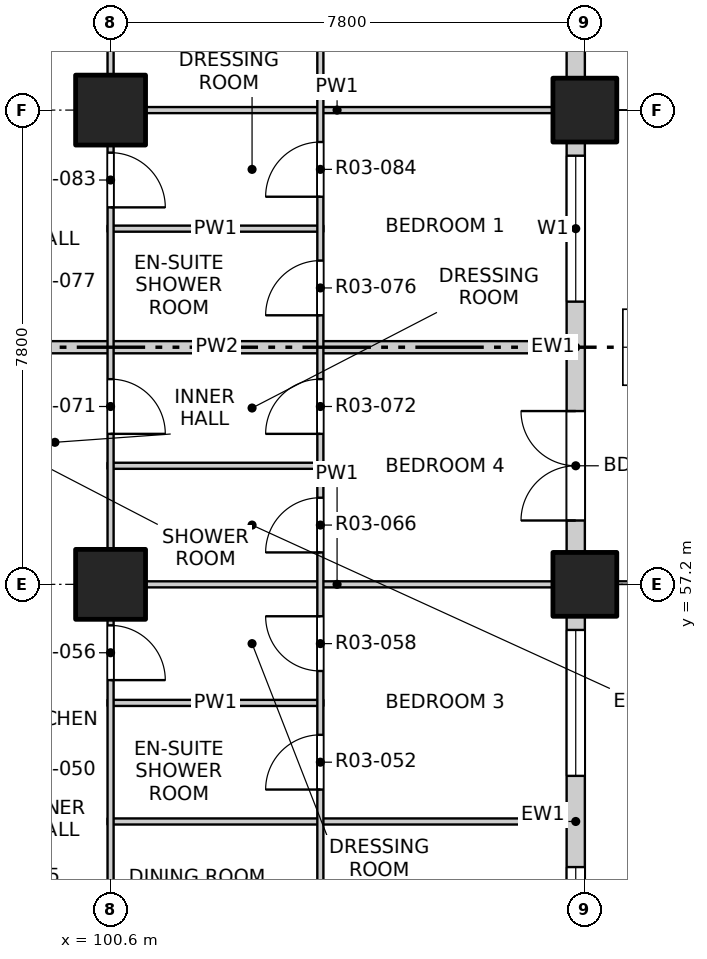
"""IFC4 building model, lengths in metres.
Left out: names, types, materials, properties, quantities, classifications, styles, units other than length and angle.
Written with IfcOpenShell. Run it as: python <this file> out.ifc"""

import sys

from ifc_helpers import new_model, si_unit, direction, frame, frame_2d, origin, origin_2d, place, context, subcontext, project, spatial, rectangle, extrude, element, fill, save


model = new_model("IFC4")
c1 = context("Model", 3, precision=1e-05, world=origin(), true_north=direction((0.0, 1.0)))
c2 = subcontext(c1, "Body", "Model", "MODEL_VIEW")
j1 = project(units=[si_unit("LENGTHUNIT", "METRE"), si_unit("PLANEANGLEUNIT", "RADIAN")], contexts=[c1])
p1 = place(None, origin())
s1 = spatial("IfcSite", under=j1, at=p1, CompositionType="ELEMENT")
p2 = place(p1, origin())
s2 = spatial("IfcBuilding", under=s1, at=p2, CompositionType="ELEMENT")
p3 = place(p2, frame((0.0, 0.0, 39.9)))
s3 = spatial("IfcBuildingStorey", under=s2, at=p3, CompositionType="ELEMENT", Elevation=39.9)
for number, where, z_axis, x_axis in (
    (1, (108.4, 57.2, -0.25), (0.0, 0.0, 1.0), (1.0, 0.0, 0.0)),
    (2, (108.4, 65.0, -0.25), (0.0, 0.0, 1.0), (1.0, 0.0, 0.0)),
):
    element("IfcColumn", number, at=place(p3, frame(where, z_axis=z_axis, x_axis=x_axis)), inside=s3, PredefinedType="COLUMN", context=c2, shape_type="SweptSolid", body=[
        extrude(rectangle(XDim=1.05, YDim=1.05, at=origin_2d()), origin(), (0.0, 0.0, 1.0), 3.4),
    ])
for number, where, z_axis, x_axis in (
    (3, (100.6, 57.2, -0.25), (0.0, 0.0, 1.0), (1.0, 0.0, 0.0)),
    (4, (100.6, 65.0, -0.25), (0.0, 0.0, 1.0), (1.0, 0.0, 0.0)),
):
    element("IfcColumn", number, at=place(p3, frame(where, z_axis=z_axis, x_axis=x_axis)), inside=s3, PredefinedType="COLUMN", context=c2, shape_type="SweptSolid", body=[
        extrude(rectangle(XDim=1.15, YDim=1.15, at=origin_2d()), origin(), (0.0, 0.0, 1.0), 3.4),
    ])
p4 = place(p3, frame((108.25, 49.925, 0.0), z_axis=(0.0, 0.0, 1.0), x_axis=(0.0, 1.0, 0.0)))
e5 = element("IfcWall", 5, at=p4, inside=s3, PredefinedType="SOLIDWALL", context=c2, shape_type="SweptSolid", body=[
    extrude(rectangle(XDim=6.75, YDim=0.3, at=frame_2d((3.375, 0.0))), origin(), (0.0, 0.0, 1.0), 2.7),
])
p5 = place(p4, frame((0.225, 0.0, 0.9)))
e6 = element("IfcOpeningElement", 6, at=p5, cuts=e5, PredefinedType="OPENING", context=c2, shape_type="SweptSolid", body=[
    extrude(rectangle(XDim=2.4, YDim=1.8, at=frame_2d((1.2, 0.9))), frame((0.0, 0.16, 0.0), z_axis=(0.0, -1.0, 0.0), x_axis=(1.0, 0.0, 0.0)), (0.0, 0.0, 1.0), 0.32),
])
p6 = place(p4, frame((4.125, 0.0, 0.9)))
e7 = element("IfcOpeningElement", 7, at=p6, cuts=e5, PredefinedType="OPENING", context=c2, shape_type="SweptSolid", body=[
    extrude(rectangle(XDim=2.4, YDim=1.8, at=frame_2d((1.2, 0.9))), frame((0.0, 0.16, 0.0), z_axis=(0.0, -1.0, 0.0), x_axis=(1.0, 0.0, 0.0)), (0.0, 0.0, 1.0), 0.32),
])
p7 = place(p3, frame((108.25, 57.725, 0.0), z_axis=(0.0, 0.0, 1.0), x_axis=(0.0, 1.0, 0.0)))
e8 = element("IfcWall", 8, at=p7, inside=s3, PredefinedType="SOLIDWALL", context=c2, shape_type="SweptSolid", body=[
    extrude(rectangle(XDim=6.75, YDim=0.3, at=frame_2d((3.375, 0.0))), origin(), (0.0, 0.0, 1.0), 2.7),
])
p8 = place(p7, frame((0.525, 0.0, 0.0)))
e9 = element("IfcOpeningElement", 9, at=p8, cuts=e8, PredefinedType="OPENING", context=c2, shape_type="SweptSolid", body=[
    extrude(rectangle(XDim=1.8, YDim=2.4, at=frame_2d((0.9, 1.2))), frame((0.0, 0.16, 0.0), z_axis=(0.0, -1.0, 0.0), x_axis=(1.0, 0.0, 0.0)), (0.0, 0.0, 1.0), 0.32),
])
p9 = place(p7, frame((4.125, 0.0, 0.9)))
e10 = element("IfcOpeningElement", 10, at=p9, cuts=e8, PredefinedType="OPENING", context=c2, shape_type="SweptSolid", body=[
    extrude(rectangle(XDim=2.4, YDim=1.8, at=frame_2d((1.2, 0.9))), frame((0.0, 0.16, 0.0), z_axis=(0.0, -1.0, 0.0), x_axis=(1.0, 0.0, 0.0)), (0.0, 0.0, 1.0), 0.32),
])
p10 = place(p3, frame((108.25, 65.525, 0.0), z_axis=(0.0, 0.0, 1.0), x_axis=(0.0, 1.0, 0.0)))
e11 = element("IfcWall", 11, at=p10, inside=s3, PredefinedType="SOLIDWALL", context=c2, shape_type="SweptSolid", body=[
    extrude(rectangle(XDim=6.75, YDim=0.3, at=frame_2d((3.375, 0.0))), origin(), (0.0, 0.0, 1.0), 2.7),
])
p11 = place(p10, frame((0.525, 0.0, 0.0)))
e12 = element("IfcOpeningElement", 12, at=p11, cuts=e11, PredefinedType="OPENING", context=c2, shape_type="SweptSolid", body=[
    extrude(rectangle(XDim=1.8, YDim=2.4, at=frame_2d((0.9, 1.2))), frame((0.0, 0.16, 0.0), z_axis=(0.0, -1.0, 0.0), x_axis=(1.0, 0.0, 0.0)), (0.0, 0.0, 1.0), 0.32),
])
p12 = place(p10, frame((4.125, 0.0, 0.9)))
e13 = element("IfcOpeningElement", 13, at=p12, cuts=e11, PredefinedType="OPENING", context=c2, shape_type="SweptSolid", body=[
    extrude(rectangle(XDim=2.4, YDim=1.8, at=frame_2d((1.2, 0.9))), frame((0.0, 0.16, 0.0), z_axis=(0.0, -1.0, 0.0), x_axis=(1.0, 0.0, 0.0)), (0.0, 0.0, 1.0), 0.32),
])
p13 = place(p3, frame((100.55, 53.3, 0.0), z_axis=(0.0, 0.0, 1.0), x_axis=(1.0, 0.0, 0.0)))
e14 = element("IfcWall", 14, at=p13, inside=s3, PredefinedType="PARTITIONING", context=c2, shape_type="SweptSolid", body=[
    extrude(rectangle(XDim=7.55, YDim=0.1, at=frame_2d((3.775, 0.0))), origin(), (0.0, 0.0, 1.0), 3.15),
])
p14 = place(p3, frame((100.55, 55.25, 0.0), z_axis=(0.0, 0.0, 1.0), x_axis=(1.0, 0.0, 0.0)))
e15 = element("IfcWall", 15, at=p14, inside=s3, PredefinedType="PARTITIONING", context=c2, shape_type="SweptSolid", body=[
    extrude(rectangle(XDim=3.55, YDim=0.1, at=frame_2d((1.775, 0.0))), origin(), (0.0, 0.0, 1.0), 3.15),
])
p15 = place(p3, frame((100.55, 57.2, 0.0), z_axis=(0.0, 0.0, 1.0), x_axis=(1.0, 0.0, 0.0)))
e16 = element("IfcWall", 16, at=p15, inside=s3, PredefinedType="PARTITIONING", context=c2, shape_type="SweptSolid", body=[
    extrude(rectangle(XDim=7.55, YDim=0.1, at=frame_2d((3.775, 0.0))), origin(), (0.0, 0.0, 1.0), 2.55),
])
p16 = place(p3, frame((100.55, 59.15, 0.0), z_axis=(0.0, 0.0, 1.0), x_axis=(1.0, 0.0, 0.0)))
e17 = element("IfcWall", 17, at=p16, inside=s3, PredefinedType="PARTITIONING", context=c2, shape_type="SweptSolid", body=[
    extrude(rectangle(XDim=3.55, YDim=0.1, at=frame_2d((1.775, 0.0))), origin(), (0.0, 0.0, 1.0), 3.15),
])
p17 = place(p3, frame((96.6, 61.1, 0.0), z_axis=(0.0, 0.0, 1.0), x_axis=(1.0, 0.0, 0.0)))
e18 = element("IfcWall", 18, at=p17, inside=s3, PredefinedType="PARTITIONING", context=c2, shape_type="SweptSolid", body=[
    extrude(rectangle(XDim=11.5, YDim=0.2, at=frame_2d((5.75, 0.0))), origin(), (0.0, 0.0, 1.0), 3.15),
])
p18 = place(p3, frame((100.55, 63.05, 0.0), z_axis=(0.0, 0.0, 1.0), x_axis=(1.0, 0.0, 0.0)))
e19 = element("IfcWall", 19, at=p18, inside=s3, PredefinedType="PARTITIONING", context=c2, shape_type="SweptSolid", body=[
    extrude(rectangle(XDim=3.55, YDim=0.1, at=frame_2d((1.775, 0.0))), origin(), (0.0, 0.0, 1.0), 3.15),
])
p19 = place(p3, frame((100.55, 65.0, 0.0), z_axis=(0.0, 0.0, 1.0), x_axis=(1.0, 0.0, 0.0)))
e20 = element("IfcWall", 20, at=p19, inside=s3, PredefinedType="PARTITIONING", context=c2, shape_type="SweptSolid", body=[
    extrude(rectangle(XDim=7.55, YDim=0.1, at=frame_2d((3.775, 0.0))), origin(), (0.0, 0.0, 1.0), 2.55),
])
p20 = place(p3, frame((100.6, 49.4, 0.0), z_axis=(0.0, 0.0, 1.0), x_axis=(0.0, 1.0, 0.0)))
e21 = element("IfcWall", 21, at=p20, inside=s3, PredefinedType="PARTITIONING", context=c2, shape_type="SweptSolid", body=[
    extrude(rectangle(XDim=31.2, YDim=0.1, at=frame_2d((15.6, 0.0))), origin(), (0.0, 0.0, 1.0), 3.15),
])
p21 = place(p20, frame((1.5, 0.0, 0.0)))
e22 = element("IfcOpeningElement", 22, at=p21, cuts=e21, PredefinedType="OPENING", context=c2, shape_type="SweptSolid", body=[
    extrude(rectangle(XDim=0.9, YDim=2.1, at=frame_2d((0.45, 1.05))), frame((0.0, 0.06, 0.0), z_axis=(0.0, -1.0, 0.0), x_axis=(1.0, 0.0, 0.0)), (0.0, 0.0, 1.0), 0.12),
])
p22 = place(p20, frame((6.225, 0.0, 0.0)))
e23 = element("IfcOpeningElement", 23, at=p22, cuts=e21, PredefinedType="OPENING", context=c2, shape_type="SweptSolid", body=[
    extrude(rectangle(XDim=0.9, YDim=2.1, at=frame_2d((0.45, 1.05))), frame((0.0, 0.06, 0.0), z_axis=(0.0, -1.0, 0.0), x_axis=(1.0, 0.0, 0.0)), (0.0, 0.0, 1.0), 0.12),
])
p23 = place(p20, frame((10.275, 0.0, 0.0)))
e24 = element("IfcOpeningElement", 24, at=p23, cuts=e21, PredefinedType="OPENING", context=c2, shape_type="SweptSolid", body=[
    extrude(rectangle(XDim=0.9, YDim=2.1, at=frame_2d((0.45, 1.05))), frame((0.0, 0.06, 0.0), z_axis=(0.0, -1.0, 0.0), x_axis=(1.0, 0.0, 0.0)), (0.0, 0.0, 1.0), 0.12),
])
p24 = place(p20, frame((14.0, 0.0, 0.0)))
e25 = element("IfcOpeningElement", 25, at=p24, cuts=e21, PredefinedType="OPENING", context=c2, shape_type="SweptSolid", body=[
    extrude(rectangle(XDim=0.9, YDim=2.1, at=frame_2d((0.45, 1.05))), frame((0.0, 0.06, 0.0), z_axis=(0.0, -1.0, 0.0), x_axis=(1.0, 0.0, 0.0)), (0.0, 0.0, 1.0), 0.12),
])
p25 = place(p20, frame((17.1, 0.0, 0.0)))
e26 = element("IfcOpeningElement", 26, at=p25, cuts=e21, PredefinedType="OPENING", context=c2, shape_type="SweptSolid", body=[
    extrude(rectangle(XDim=0.9, YDim=2.1, at=frame_2d((0.45, 1.05))), frame((0.0, 0.06, 0.0), z_axis=(0.0, -1.0, 0.0), x_axis=(1.0, 0.0, 0.0)), (0.0, 0.0, 1.0), 0.12),
])
p26 = place(p20, frame((21.0, 0.0, 0.0)))
e27 = element("IfcOpeningElement", 27, at=p26, cuts=e21, PredefinedType="OPENING", context=c2, shape_type="SweptSolid", body=[
    extrude(rectangle(XDim=0.9, YDim=2.1, at=frame_2d((0.45, 1.05))), frame((0.0, 0.06, 0.0), z_axis=(0.0, -1.0, 0.0), x_axis=(1.0, 0.0, 0.0)), (0.0, 0.0, 1.0), 0.12),
])
p27 = place(p20, frame((25.875, 0.0, 0.0)))
e28 = element("IfcOpeningElement", 28, at=p27, cuts=e21, PredefinedType="OPENING", context=c2, shape_type="SweptSolid", body=[
    extrude(rectangle(XDim=0.9, YDim=2.1, at=frame_2d((0.45, 1.05))), frame((0.0, 0.06, 0.0), z_axis=(0.0, -1.0, 0.0), x_axis=(1.0, 0.0, 0.0)), (0.0, 0.0, 1.0), 0.12),
])
p28 = place(p20, frame((29.6, 0.0, 0.0)))
e29 = element("IfcOpeningElement", 29, at=p28, cuts=e21, PredefinedType="OPENING", context=c2, shape_type="SweptSolid", body=[
    extrude(rectangle(XDim=0.9, YDim=2.1, at=frame_2d((0.45, 1.05))), frame((0.0, 0.06, 0.0), z_axis=(0.0, -1.0, 0.0), x_axis=(1.0, 0.0, 0.0)), (0.0, 0.0, 1.0), 0.12),
])
p29 = place(p3, frame((104.05, 41.9, 0.0), z_axis=(0.0, 0.0, 1.0), x_axis=(0.0, 1.0, 0.0)))
e30 = element("IfcWall", 30, at=p29, inside=s3, PredefinedType="PARTITIONING", context=c2, shape_type="SweptSolid", body=[
    extrude(rectangle(XDim=46.2, YDim=0.1, at=frame_2d((23.1, 0.0))), origin(), (0.0, 0.0, 1.0), 3.15),
])
p30 = place(p29, frame((1.05, 0.0, 0.0)))
e31 = element("IfcOpeningElement", 31, at=p30, cuts=e30, PredefinedType="OPENING", context=c2, shape_type="SweptSolid", body=[
    extrude(rectangle(XDim=1.2, YDim=2.1, at=frame_2d((0.6, 1.05))), frame((0.0, 0.06, 0.0), z_axis=(0.0, -1.0, 0.0), x_axis=(1.0, 0.0, 0.0)), (0.0, 0.0, 1.0), 0.12),
])
p31 = place(p29, frame((4.125, 0.0, 0.0)))
e32 = element("IfcOpeningElement", 32, at=p31, cuts=e30, PredefinedType="OPENING", context=c2, shape_type="SweptSolid", body=[
    extrude(rectangle(XDim=0.9, YDim=2.1, at=frame_2d((0.45, 1.05))), frame((0.0, 0.06, 0.0), z_axis=(0.0, -1.0, 0.0), x_axis=(1.0, 0.0, 0.0)), (0.0, 0.0, 1.0), 0.12),
])
p32 = place(p29, frame((6.075, 0.0, 0.0)))
e33 = element("IfcOpeningElement", 33, at=p32, cuts=e30, PredefinedType="OPENING", context=c2, shape_type="SweptSolid", body=[
    extrude(rectangle(XDim=0.9, YDim=2.1, at=frame_2d((0.45, 1.05))), frame((0.0, 0.06, 0.0), z_axis=(0.0, -1.0, 0.0), x_axis=(1.0, 0.0, 0.0)), (0.0, 0.0, 1.0), 0.12),
])
p33 = place(p29, frame((8.85, 0.0, 0.0)))
e34 = element("IfcOpeningElement", 34, at=p33, cuts=e30, PredefinedType="OPENING", context=c2, shape_type="SweptSolid", body=[
    extrude(rectangle(XDim=1.2, YDim=2.1, at=frame_2d((0.6, 1.05))), frame((0.0, 0.06, 0.0), z_axis=(0.0, -1.0, 0.0), x_axis=(1.0, 0.0, 0.0)), (0.0, 0.0, 1.0), 0.12),
])
p34 = place(p29, frame((11.925, 0.0, 0.0)))
e35 = element("IfcOpeningElement", 35, at=p34, cuts=e30, PredefinedType="OPENING", context=c2, shape_type="SweptSolid", body=[
    extrude(rectangle(XDim=0.9, YDim=2.1, at=frame_2d((0.45, 1.05))), frame((0.0, 0.06, 0.0), z_axis=(0.0, -1.0, 0.0), x_axis=(1.0, 0.0, 0.0)), (0.0, 0.0, 1.0), 0.12),
])
p35 = place(p29, frame((13.875, 0.0, 0.0)))
e36 = element("IfcOpeningElement", 36, at=p35, cuts=e30, PredefinedType="OPENING", context=c2, shape_type="SweptSolid", body=[
    extrude(rectangle(XDim=0.9, YDim=2.1, at=frame_2d((0.45, 1.05))), frame((0.0, 0.06, 0.0), z_axis=(0.0, -1.0, 0.0), x_axis=(1.0, 0.0, 0.0)), (0.0, 0.0, 1.0), 0.12),
])
p36 = place(p29, frame((15.825, 0.0, 0.0)))
e37 = element("IfcOpeningElement", 37, at=p36, cuts=e30, PredefinedType="OPENING", context=c2, shape_type="SweptSolid", body=[
    extrude(rectangle(XDim=0.9, YDim=2.1, at=frame_2d((0.45, 1.05))), frame((0.0, 0.06, 0.0), z_axis=(0.0, -1.0, 0.0), x_axis=(1.0, 0.0, 0.0)), (0.0, 0.0, 1.0), 0.12),
])
p37 = place(p29, frame((17.775, 0.0, 0.0)))
e38 = element("IfcOpeningElement", 38, at=p37, cuts=e30, PredefinedType="OPENING", context=c2, shape_type="SweptSolid", body=[
    extrude(rectangle(XDim=0.9, YDim=2.1, at=frame_2d((0.45, 1.05))), frame((0.0, 0.06, 0.0), z_axis=(0.0, -1.0, 0.0), x_axis=(1.0, 0.0, 0.0)), (0.0, 0.0, 1.0), 0.12),
])
p38 = place(p29, frame((19.725, 0.0, 0.0)))
e39 = element("IfcOpeningElement", 39, at=p38, cuts=e30, PredefinedType="OPENING", context=c2, shape_type="SweptSolid", body=[
    extrude(rectangle(XDim=0.9, YDim=2.1, at=frame_2d((0.45, 1.05))), frame((0.0, 0.06, 0.0), z_axis=(0.0, -1.0, 0.0), x_axis=(1.0, 0.0, 0.0)), (0.0, 0.0, 1.0), 0.12),
])
p39 = place(p29, frame((21.675, 0.0, 0.0)))
e40 = element("IfcOpeningElement", 40, at=p39, cuts=e30, PredefinedType="OPENING", context=c2, shape_type="SweptSolid", body=[
    extrude(rectangle(XDim=0.9, YDim=2.1, at=frame_2d((0.45, 1.05))), frame((0.0, 0.06, 0.0), z_axis=(0.0, -1.0, 0.0), x_axis=(1.0, 0.0, 0.0)), (0.0, 0.0, 1.0), 0.12),
])
p40 = place(p29, frame((24.45, 0.0, 0.0)))
e41 = element("IfcOpeningElement", 41, at=p40, cuts=e30, PredefinedType="OPENING", context=c2, shape_type="SweptSolid", body=[
    extrude(rectangle(XDim=1.2, YDim=2.1, at=frame_2d((0.6, 1.05))), frame((0.0, 0.06, 0.0), z_axis=(0.0, -1.0, 0.0), x_axis=(1.0, 0.0, 0.0)), (0.0, 0.0, 1.0), 0.12),
])
p41 = place(p29, frame((28.35, 0.0, 0.0)))
e42 = element("IfcOpeningElement", 42, at=p41, cuts=e30, PredefinedType="OPENING", context=c2, shape_type="SweptSolid", body=[
    extrude(rectangle(XDim=1.2, YDim=2.1, at=frame_2d((0.6, 1.05))), frame((0.0, 0.06, 0.0), z_axis=(0.0, -1.0, 0.0), x_axis=(1.0, 0.0, 0.0)), (0.0, 0.0, 1.0), 0.12),
])
p42 = place(p29, frame((31.425, 0.0, 0.0)))
e43 = element("IfcOpeningElement", 43, at=p42, cuts=e30, PredefinedType="OPENING", context=c2, shape_type="SweptSolid", body=[
    extrude(rectangle(XDim=0.9, YDim=2.1, at=frame_2d((0.45, 1.05))), frame((0.0, 0.06, 0.0), z_axis=(0.0, -1.0, 0.0), x_axis=(1.0, 0.0, 0.0)), (0.0, 0.0, 1.0), 0.12),
])
p43 = place(p29, frame((33.375, 0.0, 0.0)))
e44 = element("IfcOpeningElement", 44, at=p43, cuts=e30, PredefinedType="OPENING", context=c2, shape_type="SweptSolid", body=[
    extrude(rectangle(XDim=0.9, YDim=2.1, at=frame_2d((0.45, 1.05))), frame((0.0, 0.06, 0.0), z_axis=(0.0, -1.0, 0.0), x_axis=(1.0, 0.0, 0.0)), (0.0, 0.0, 1.0), 0.12),
])
p44 = place(p29, frame((35.325, 0.0, 0.0)))
e45 = element("IfcOpeningElement", 45, at=p44, cuts=e30, PredefinedType="OPENING", context=c2, shape_type="SweptSolid", body=[
    extrude(rectangle(XDim=0.9, YDim=2.1, at=frame_2d((0.45, 1.05))), frame((0.0, 0.06, 0.0), z_axis=(0.0, -1.0, 0.0), x_axis=(1.0, 0.0, 0.0)), (0.0, 0.0, 1.0), 0.12),
])
p45 = place(p29, frame((37.275, 0.0, 0.0)))
e46 = element("IfcOpeningElement", 46, at=p45, cuts=e30, PredefinedType="OPENING", context=c2, shape_type="SweptSolid", body=[
    extrude(rectangle(XDim=0.9, YDim=2.1, at=frame_2d((0.45, 1.05))), frame((0.0, 0.06, 0.0), z_axis=(0.0, -1.0, 0.0), x_axis=(1.0, 0.0, 0.0)), (0.0, 0.0, 1.0), 0.12),
])
p46 = place(p29, frame((40.05, 0.0, 0.0)))
e47 = element("IfcOpeningElement", 47, at=p46, cuts=e30, PredefinedType="OPENING", context=c2, shape_type="SweptSolid", body=[
    extrude(rectangle(XDim=1.2, YDim=2.1, at=frame_2d((0.6, 1.05))), frame((0.0, 0.06, 0.0), z_axis=(0.0, -1.0, 0.0), x_axis=(1.0, 0.0, 0.0)), (0.0, 0.0, 1.0), 0.12),
])
p47 = place(p29, frame((43.95, 0.0, 0.0)))
e48 = element("IfcOpeningElement", 48, at=p47, cuts=e30, PredefinedType="OPENING", context=c2, shape_type="SweptSolid", body=[
    extrude(rectangle(XDim=1.2, YDim=2.1, at=frame_2d((0.6, 1.05))), frame((0.0, 0.06, 0.0), z_axis=(0.0, -1.0, 0.0), x_axis=(1.0, 0.0, 0.0)), (0.0, 0.0, 1.0), 0.12),
])
p48 = place(p5, origin())
e49 = element("IfcWindow", 49, at=p48, inside=s3, PartitioningType="DOUBLE_PANEL_VERTICAL", PredefinedType="WINDOW", context=c2, shape_type="SweptSolid", body=[
    extrude(rectangle(XDim=2.4, YDim=1.8, at=frame_2d((1.2, 0.9))), frame((0.0, 0.03, 0.0), z_axis=(0.0, -1.0, 0.0), x_axis=(1.0, 0.0, 0.0)), (0.0, 0.0, 1.0), 0.06),
])
fill(e6, e49)
p49 = place(p6, origin())
e50 = element("IfcWindow", 50, at=p49, inside=s3, PartitioningType="DOUBLE_PANEL_VERTICAL", PredefinedType="WINDOW", context=c2, shape_type="SweptSolid", body=[
    extrude(rectangle(XDim=2.4, YDim=1.8, at=frame_2d((1.2, 0.9))), frame((0.0, 0.03, 0.0), z_axis=(0.0, -1.0, 0.0), x_axis=(1.0, 0.0, 0.0)), (0.0, 0.0, 1.0), 0.06),
])
fill(e7, e50)
p50 = place(p8, origin())
e51 = element("IfcDoor", 51, at=p50, inside=s3, OperationType="DOUBLE_DOOR_SINGLE_SWING", PredefinedType="DOOR", context=c2, shape_type="SweptSolid", body=[
    extrude(rectangle(XDim=1.8, YDim=2.4, at=frame_2d((0.9, 1.2))), frame((0.0, 0.025, 0.0), z_axis=(0.0, -1.0, 0.0), x_axis=(1.0, 0.0, 0.0)), (0.0, 0.0, 1.0), 0.05),
])
fill(e9, e51)
p51 = place(p9, origin())
e52 = element("IfcWindow", 52, at=p51, inside=s3, PartitioningType="DOUBLE_PANEL_VERTICAL", PredefinedType="WINDOW", context=c2, shape_type="SweptSolid", body=[
    extrude(rectangle(XDim=2.4, YDim=1.8, at=frame_2d((1.2, 0.9))), frame((0.0, 0.03, 0.0), z_axis=(0.0, -1.0, 0.0), x_axis=(1.0, 0.0, 0.0)), (0.0, 0.0, 1.0), 0.06),
])
fill(e10, e52)
p52 = place(p34, origin())
e53 = element("IfcDoor", 53, at=p52, inside=s3, OperationType="SINGLE_SWING_LEFT", PredefinedType="DOOR", context=c2, shape_type="SweptSolid", body=[
    extrude(rectangle(XDim=0.9, YDim=2.1, at=frame_2d((0.45, 1.05))), frame((0.0, 0.025, 0.0), z_axis=(0.0, -1.0, 0.0), x_axis=(1.0, 0.0, 0.0)), (0.0, 0.0, 1.0), 0.05),
])
fill(e35, e53)
p53 = place(p22, origin())
e54 = element("IfcDoor", 54, at=p53, inside=s3, OperationType="SINGLE_SWING_RIGHT", PredefinedType="DOOR", context=c2, shape_type="SweptSolid", body=[
    extrude(rectangle(XDim=0.9, YDim=2.1, at=frame_2d((0.45, 1.05))), frame((0.0, 0.025, 0.0), z_axis=(0.0, -1.0, 0.0), x_axis=(1.0, 0.0, 0.0)), (0.0, 0.0, 1.0), 0.05),
])
fill(e23, e54)
p54 = place(p35, origin())
e55 = element("IfcDoor", 55, at=p54, inside=s3, OperationType="SINGLE_SWING_RIGHT", PredefinedType="DOOR", context=c2, shape_type="SweptSolid", body=[
    extrude(rectangle(XDim=0.9, YDim=2.1, at=frame_2d((0.45, 1.05))), frame((0.0, 0.025, 0.0), z_axis=(0.0, -1.0, 0.0), x_axis=(1.0, 0.0, 0.0)), (0.0, 0.0, 1.0), 0.05),
])
fill(e36, e55)
p55 = place(p36, origin())
e56 = element("IfcDoor", 56, at=p55, inside=s3, OperationType="SINGLE_SWING_LEFT", PredefinedType="DOOR", context=c2, shape_type="SweptSolid", body=[
    extrude(rectangle(XDim=0.9, YDim=2.1, at=frame_2d((0.45, 1.05))), frame((0.0, 0.025, 0.0), z_axis=(0.0, -1.0, 0.0), x_axis=(1.0, 0.0, 0.0)), (0.0, 0.0, 1.0), 0.05),
])
fill(e37, e56)
p56 = place(p23, origin())
e57 = element("IfcDoor", 57, at=p56, inside=s3, OperationType="SINGLE_SWING_RIGHT", PredefinedType="DOOR", context=c2, shape_type="SweptSolid", body=[
    extrude(rectangle(XDim=0.9, YDim=2.1, at=frame_2d((0.45, 1.05))), frame((0.0, 0.025, 0.0), z_axis=(0.0, -1.0, 0.0), x_axis=(1.0, 0.0, 0.0)), (0.0, 0.0, 1.0), 0.05),
])
fill(e24, e57)
p57 = place(p37, origin())
e58 = element("IfcDoor", 58, at=p57, inside=s3, OperationType="SINGLE_SWING_LEFT", PredefinedType="DOOR", context=c2, shape_type="SweptSolid", body=[
    extrude(rectangle(XDim=0.9, YDim=2.1, at=frame_2d((0.45, 1.05))), frame((0.0, 0.025, 0.0), z_axis=(0.0, -1.0, 0.0), x_axis=(1.0, 0.0, 0.0)), (0.0, 0.0, 1.0), 0.05),
])
fill(e38, e58)
p58 = place(p38, origin())
e59 = element("IfcDoor", 59, at=p58, inside=s3, OperationType="SINGLE_SWING_LEFT", PredefinedType="DOOR", context=c2, shape_type="SweptSolid", body=[
    extrude(rectangle(XDim=0.9, YDim=2.1, at=frame_2d((0.45, 1.05))), frame((0.0, 0.025, 0.0), z_axis=(0.0, -1.0, 0.0), x_axis=(1.0, 0.0, 0.0)), (0.0, 0.0, 1.0), 0.05),
])
fill(e39, e59)
p59 = place(p24, origin())
e60 = element("IfcDoor", 60, at=p59, inside=s3, OperationType="SINGLE_SWING_RIGHT", PredefinedType="DOOR", context=c2, shape_type="SweptSolid", body=[
    extrude(rectangle(XDim=0.9, YDim=2.1, at=frame_2d((0.45, 1.05))), frame((0.0, 0.025, 0.0), z_axis=(0.0, -1.0, 0.0), x_axis=(1.0, 0.0, 0.0)), (0.0, 0.0, 1.0), 0.05),
])
fill(e25, e60)
p60 = place(p39, origin())
e61 = element("IfcDoor", 61, at=p60, inside=s3, OperationType="SINGLE_SWING_LEFT", PredefinedType="DOOR", context=c2, shape_type="SweptSolid", body=[
    extrude(rectangle(XDim=0.9, YDim=2.1, at=frame_2d((0.45, 1.05))), frame((0.0, 0.025, 0.0), z_axis=(0.0, -1.0, 0.0), x_axis=(1.0, 0.0, 0.0)), (0.0, 0.0, 1.0), 0.05),
])
fill(e40, e61)
save(model, sys.argv[1])
